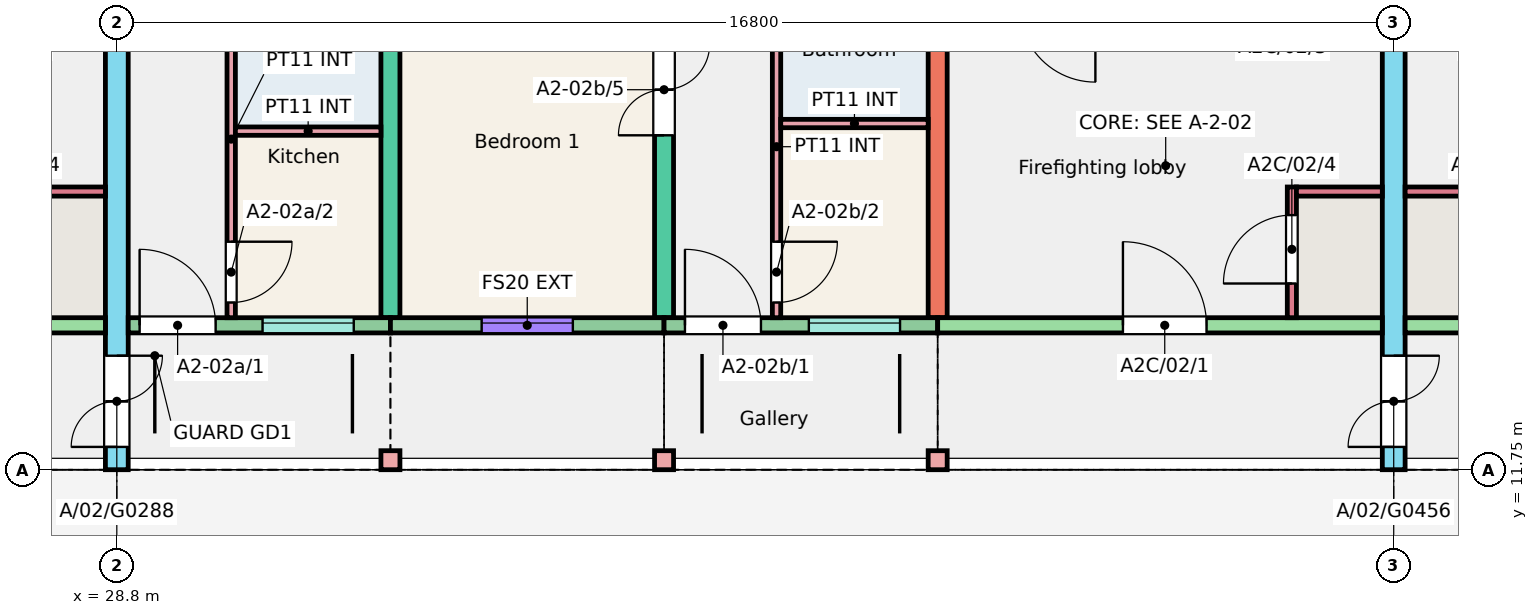
"""IFC4 building model, lengths in metres.
Left out: names, types, materials, properties, quantities, classifications, styles, units other than length and angle.
Written with IfcOpenShell. Run it as: python <this file> out.ifc"""

import sys

from ifc_helpers import new_model, si_unit, direction, frame, frame_2d, origin, origin_2d, place, context, subcontext, project, spatial, rectangle, extrude, element, fill, save


model = new_model("IFC4")
c1 = context("Model", 3, precision=1e-05, world=origin(), true_north=direction((0.0, 1.0)))
c2 = subcontext(c1, "Body", "Model", "MODEL_VIEW")
j1 = project(units=[si_unit("LENGTHUNIT", "METRE"), si_unit("PLANEANGLEUNIT", "RADIAN")], contexts=[c1])
p1 = place(None, origin())
s1 = spatial("IfcSite", under=j1, at=p1, CompositionType="ELEMENT")
p2 = place(p1, origin())
s2 = spatial("IfcBuilding", under=s1, at=p2, CompositionType="ELEMENT")
p3 = place(p2, frame((0.0, 0.0, 6.0)))
s3 = spatial("IfcBuildingStorey", under=s2, at=p3, CompositionType="ELEMENT", Elevation=6.0)
p4 = place(p3, frame((28.8, 11.75, 0.0), z_axis=(0.0, 0.0, 1.0), x_axis=(0.0, 1.0, 0.0)))
e1 = element("IfcWall", 1, at=p4, inside=s3, PredefinedType="SHEAR", context=c2, shape_type="SweptSolid", body=[
    extrude(rectangle(XDim=11.0, YDim=0.3, at=frame_2d((5.5, 0.0))), origin(), (0.0, 0.0, 1.0), 3.0),
])
p5 = place(p4, frame((0.3, 0.0, 0.0)))
e2 = element("IfcOpeningElement", 2, at=p5, cuts=e1, PredefinedType="OPENING", context=c2, shape_type="SweptSolid", body=[
    extrude(rectangle(XDim=1.2, YDim=2.1, at=frame_2d((0.6, 1.05))), frame((0.0, 0.16, 0.0), z_axis=(0.0, -1.0, 0.0), x_axis=(1.0, 0.0, 0.0)), (0.0, 0.0, 1.0), 0.32),
])
p6 = place(p3, frame((32.4, 13.75, 0.0), z_axis=(0.0, 0.0, 1.0), x_axis=(0.0, 1.0, 0.0)))
e3 = element("IfcWall", 3, at=p6, inside=s3, PredefinedType="SHEAR", context=c2, shape_type="SweptSolid", body=[
    extrude(rectangle(XDim=9.0, YDim=0.25, at=frame_2d((4.5, 0.0))), origin(), (0.0, 0.0, 1.0), 3.0),
])
p7 = place(p3, frame((36.0, 13.75, 0.0), z_axis=(0.0, 0.0, 1.0), x_axis=(0.0, 1.0, 0.0)))
e4 = element("IfcWall", 4, at=p7, inside=s3, PredefinedType="SHEAR", context=c2, shape_type="SweptSolid", body=[
    extrude(rectangle(XDim=9.0, YDim=0.25, at=frame_2d((4.5, 0.0))), origin(), (0.0, 0.0, 1.0), 3.0),
])
p8 = place(p7, frame((2.4, 0.0, 0.0)))
e5 = element("IfcOpeningElement", 5, at=p8, cuts=e4, PredefinedType="OPENING", context=c2, shape_type="SweptSolid", body=[
    extrude(rectangle(XDim=1.2, YDim=2.1, at=frame_2d((0.6, 1.05))), frame((0.0, 0.135, 0.0), z_axis=(0.0, -1.0, 0.0), x_axis=(1.0, 0.0, 0.0)), (0.0, 0.0, 1.0), 0.27),
])
p9 = place(p7, frame((6.4, 0.0, 0.0)))
e6 = element("IfcOpeningElement", 6, at=p9, cuts=e4, PredefinedType="OPENING", context=c2, shape_type="SweptSolid", body=[
    extrude(rectangle(XDim=1.2, YDim=2.1, at=frame_2d((0.6, 1.05))), frame((0.0, 0.135, 0.0), z_axis=(0.0, -1.0, 0.0), x_axis=(1.0, 0.0, 0.0)), (0.0, 0.0, 1.0), 0.27),
])
p10 = place(p3, frame((39.6, 13.75, 0.0), z_axis=(0.0, 0.0, 1.0), x_axis=(0.0, 1.0, 0.0)))
e7 = element("IfcWall", 7, at=p10, inside=s3, PredefinedType="SHEAR", context=c2, shape_type="SweptSolid", body=[
    extrude(rectangle(XDim=9.0, YDim=0.25, at=frame_2d((4.5, 0.0))), origin(), (0.0, 0.0, 1.0), 3.0),
])
p11 = place(p3, frame((45.6, 11.75, 0.0), z_axis=(0.0, 0.0, 1.0), x_axis=(0.0, 1.0, 0.0)))
e8 = element("IfcWall", 8, at=p11, inside=s3, PredefinedType="SHEAR", context=c2, shape_type="SweptSolid", body=[
    extrude(rectangle(XDim=11.0, YDim=0.3, at=frame_2d((5.5, 0.0))), origin(), (0.0, 0.0, 1.0), 3.0),
])
p12 = place(p11, frame((0.3, 0.0, 0.0)))
e9 = element("IfcOpeningElement", 9, at=p12, cuts=e8, PredefinedType="OPENING", context=c2, shape_type="SweptSolid", body=[
    extrude(rectangle(XDim=1.2, YDim=2.1, at=frame_2d((0.6, 1.05))), frame((0.0, 0.16, 0.0), z_axis=(0.0, -1.0, 0.0), x_axis=(1.0, 0.0, 0.0)), (0.0, 0.0, 1.0), 0.32),
])
p13 = place(p3, frame((22.8, 13.65, 0.0), z_axis=(0.0, 0.0, 1.0), x_axis=(1.0, 0.0, 0.0)))
e10 = element("IfcWall", 10, at=p13, inside=s3, PredefinedType="SHEAR", context=c2, shape_type="SweptSolid", body=[
    extrude(rectangle(XDim=5.85, YDim=0.2, at=frame_2d((2.925, 0.0))), origin(), (0.0, 0.0, 1.0), 3.0),
])
p14 = place(p13, frame((2.438, 0.0, 0.0)))
e11 = element("IfcOpeningElement", 11, at=p14, cuts=e10, PredefinedType="OPENING", context=c2, shape_type="SweptSolid", body=[
    extrude(rectangle(XDim=1.1, YDim=2.1, at=frame_2d((0.55, 1.05))), frame((0.0, 0.11, 0.0), z_axis=(0.0, -1.0, 0.0), x_axis=(1.0, 0.0, 0.0)), (0.0, 0.0, 1.0), 0.22),
])
p15 = place(p3, frame((27.52, 15.41, 0.0), z_axis=(0.0, 0.0, 1.0), x_axis=(1.0, 0.0, 0.0)))
e12 = element("IfcWall", 12, at=p15, inside=s3, PredefinedType="SHEAR", context=c2, shape_type="SweptSolid", body=[
    extrude(rectangle(XDim=1.13, YDim=0.12, at=frame_2d((0.565, 0.0))), origin(), (0.0, 0.0, 1.0), 3.0),
])
p16 = place(p3, frame((28.95, 13.65, 0.0), z_axis=(0.0, 0.0, 1.0), x_axis=(1.0, 0.0, 0.0)))
e13 = element("IfcWall", 13, at=p16, inside=s3, PredefinedType="SOLIDWALL", context=c2, shape_type="SweptSolid", body=[
    extrude(rectangle(XDim=3.45, YDim=0.2, at=frame_2d((1.725, 0.0))), origin(), (0.0, 0.0, 1.0), 3.0),
])
p17 = place(p16, frame((1.768, 0.0, 1.1)))
e14 = element("IfcOpeningElement", 14, at=p17, cuts=e13, PredefinedType="OPENING", context=c2, shape_type="SweptSolid", body=[
    extrude(rectangle(XDim=1.2, YDim=1.3, at=frame_2d((0.6, 0.65))), frame((0.0, 0.11, 0.0), z_axis=(0.0, -1.0, 0.0), x_axis=(1.0, 0.0, 0.0)), (0.0, 0.0, 1.0), 0.22),
])
p18 = place(p16, frame((0.15, 0.0, 0.0)))
e15 = element("IfcOpeningElement", 15, at=p18, cuts=e13, PredefinedType="OPENING", context=c2, shape_type="SweptSolid", body=[
    extrude(rectangle(XDim=1.0, YDim=2.1, at=frame_2d((0.5, 1.05))), frame((0.0, 0.11, 0.0), z_axis=(0.0, -1.0, 0.0), x_axis=(1.0, 0.0, 0.0)), (0.0, 0.0, 1.0), 0.22),
])
p19 = place(p3, frame((32.4, 13.65, 0.0), z_axis=(0.0, 0.0, 1.0), x_axis=(1.0, 0.0, 0.0)))
e16 = element("IfcWall", 16, at=p19, inside=s3, PredefinedType="SOLIDWALL", context=c2, shape_type="SweptSolid", body=[
    extrude(rectangle(XDim=3.6, YDim=0.2, at=frame_2d((1.8, 0.0))), origin(), (0.0, 0.0, 1.0), 3.0),
])
p20 = place(p19, frame((1.2, 0.0, 0.8)))
e17 = element("IfcOpeningElement", 17, at=p20, cuts=e16, PredefinedType="OPENING", context=c2, shape_type="SweptSolid", body=[
    extrude(rectangle(XDim=1.2, YDim=1.6, at=frame_2d((0.6, 0.8))), frame((0.0, 0.11, 0.0), z_axis=(0.0, -1.0, 0.0), x_axis=(1.0, 0.0, 0.0)), (0.0, 0.0, 1.0), 0.22),
])
p21 = place(p3, frame((36.0, 13.65, 0.0), z_axis=(0.0, 0.0, 1.0), x_axis=(1.0, 0.0, 0.0)))
e18 = element("IfcWall", 18, at=p21, inside=s3, PredefinedType="SOLIDWALL", context=c2, shape_type="SweptSolid", body=[
    extrude(rectangle(XDim=3.6, YDim=0.2, at=frame_2d((1.8, 0.0))), origin(), (0.0, 0.0, 1.0), 3.0),
])
p22 = place(p21, frame((1.905, 0.0, 1.1)))
e19 = element("IfcOpeningElement", 19, at=p22, cuts=e18, PredefinedType="OPENING", context=c2, shape_type="SweptSolid", body=[
    extrude(rectangle(XDim=1.2, YDim=1.3, at=frame_2d((0.6, 0.65))), frame((0.0, 0.11, 0.0), z_axis=(0.0, -1.0, 0.0), x_axis=(1.0, 0.0, 0.0)), (0.0, 0.0, 1.0), 0.22),
])
p23 = place(p21, frame((0.275, 0.0, 0.0)))
e20 = element("IfcOpeningElement", 20, at=p23, cuts=e18, PredefinedType="OPENING", context=c2, shape_type="SweptSolid", body=[
    extrude(rectangle(XDim=1.0, YDim=2.1, at=frame_2d((0.5, 1.05))), frame((0.0, 0.11, 0.0), z_axis=(0.0, -1.0, 0.0), x_axis=(1.0, 0.0, 0.0)), (0.0, 0.0, 1.0), 0.22),
])
p24 = place(p3, frame((39.6, 13.65, 0.0), z_axis=(0.0, 0.0, 1.0), x_axis=(1.0, 0.0, 0.0)))
e21 = element("IfcWall", 21, at=p24, inside=s3, PredefinedType="SHEAR", context=c2, shape_type="SweptSolid", body=[
    extrude(rectangle(XDim=5.85, YDim=0.2, at=frame_2d((2.925, 0.0))), origin(), (0.0, 0.0, 1.0), 3.0),
])
p25 = place(p24, frame((2.438, 0.0, 0.0)))
e22 = element("IfcOpeningElement", 22, at=p25, cuts=e21, PredefinedType="OPENING", context=c2, shape_type="SweptSolid", body=[
    extrude(rectangle(XDim=1.1, YDim=2.1, at=frame_2d((0.55, 1.05))), frame((0.0, 0.11, 0.0), z_axis=(0.0, -1.0, 0.0), x_axis=(1.0, 0.0, 0.0)), (0.0, 0.0, 1.0), 0.22),
])
p26 = place(p3, frame((44.26, 13.75, 0.0), z_axis=(0.0, 0.0, 1.0), x_axis=(0.0, 1.0, 0.0)))
e23 = element("IfcWall", 23, at=p26, inside=s3, PredefinedType="SHEAR", context=c2, shape_type="SweptSolid", body=[
    extrude(rectangle(XDim=1.72, YDim=0.12, at=frame_2d((0.86, 0.0))), origin(), (0.0, 0.0, 1.0), 3.0),
])
p27 = place(p26, frame((0.45, 0.0, 0.0)))
e24 = element("IfcOpeningElement", 24, at=p27, cuts=e23, PredefinedType="OPENING", context=c2, shape_type="SweptSolid", body=[
    extrude(rectangle(XDim=0.9, YDim=2.1, at=frame_2d((0.45, 1.05))), frame((0.0, 0.07, 0.0), z_axis=(0.0, -1.0, 0.0), x_axis=(1.0, 0.0, 0.0)), (0.0, 0.0, 1.0), 0.14),
])
p28 = place(p3, frame((44.32, 15.41, 0.0), z_axis=(0.0, 0.0, 1.0), x_axis=(1.0, 0.0, 0.0)))
e25 = element("IfcWall", 25, at=p28, inside=s3, PredefinedType="SHEAR", context=c2, shape_type="SweptSolid", body=[
    extrude(rectangle(XDim=1.13, YDim=0.12, at=frame_2d((0.565, 0.0))), origin(), (0.0, 0.0, 1.0), 3.0),
])
p29 = place(p3, frame((45.75, 13.65, 0.0), z_axis=(0.0, 0.0, 1.0), x_axis=(1.0, 0.0, 0.0)))
e26 = element("IfcWall", 26, at=p29, inside=s3, PredefinedType="SHEAR", context=c2, shape_type="SweptSolid", body=[
    extrude(rectangle(XDim=5.85, YDim=0.2, at=frame_2d((2.925, 0.0))), origin(), (0.0, 0.0, 1.0), 3.0),
])
p30 = place(p29, frame((2.312, 0.0, 0.0)))
e27 = element("IfcOpeningElement", 27, at=p30, cuts=e26, PredefinedType="OPENING", context=c2, shape_type="SweptSolid", body=[
    extrude(rectangle(XDim=1.1, YDim=2.1, at=frame_2d((0.55, 1.05))), frame((0.0, 0.11, 0.0), z_axis=(0.0, -1.0, 0.0), x_axis=(1.0, 0.0, 0.0)), (0.0, 0.0, 1.0), 0.22),
])
p31 = place(p3, frame((45.75, 15.41, 0.0), z_axis=(0.0, 0.0, 1.0), x_axis=(1.0, 0.0, 0.0)))
e28 = element("IfcWall", 28, at=p31, inside=s3, PredefinedType="SHEAR", context=c2, shape_type="SweptSolid", body=[
    extrude(rectangle(XDim=1.13, YDim=0.12, at=frame_2d((0.565, 0.0))), origin(), (0.0, 0.0, 1.0), 3.0),
])
for number, where, z_axis, x_axis in (
    (29, (32.4, 11.875, 0.0), (0.0, 0.0, 1.0), (1.0, 0.0, 0.0)),
    (30, (36.0, 11.875, 0.0), (0.0, 0.0, 1.0), (1.0, 0.0, 0.0)),
    (31, (39.6, 11.875, 0.0), (0.0, 0.0, 1.0), (1.0, 0.0, 0.0)),
):
    element("IfcColumn", number, at=place(p3, frame(where, z_axis=z_axis, x_axis=x_axis)), inside=s3, PredefinedType="COLUMN", context=c2, shape_type="SweptSolid", body=[
        extrude(rectangle(XDim=0.25, YDim=0.25, at=origin_2d()), origin(), (0.0, 0.0, 1.0), 3.0),
    ])
p32 = place(p3, frame((30.305, 13.75, 0.0), z_axis=(0.0, 0.0, 1.0), x_axis=(0.0, 1.0, 0.0)))
e32 = element("IfcWall", 32, at=p32, inside=s3, PredefinedType="PARTITIONING", context=c2, shape_type="SweptSolid", body=[
    extrude(rectangle(XDim=4.7, YDim=0.11, at=frame_2d((2.35, 0.0))), origin(), (0.0, 0.0, 1.0), 2.8),
])
p33 = place(p32, frame((0.2, 0.0, 0.0)))
e33 = element("IfcOpeningElement", 33, at=p33, cuts=e32, PredefinedType="OPENING", context=c2, shape_type="SweptSolid", body=[
    extrude(rectangle(XDim=0.8, YDim=2.1, at=frame_2d((0.4, 1.05))), frame((0.0, 0.065, 0.0), z_axis=(0.0, -1.0, 0.0), x_axis=(1.0, 0.0, 0.0)), (0.0, 0.0, 1.0), 0.13),
])
p34 = place(p32, frame((3.75, 0.0, 0.0)))
e34 = element("IfcOpeningElement", 34, at=p34, cuts=e32, PredefinedType="OPENING", context=c2, shape_type="SweptSolid", body=[
    extrude(rectangle(XDim=0.8, YDim=2.1, at=frame_2d((0.4, 1.05))), frame((0.0, 0.065, 0.0), z_axis=(0.0, -1.0, 0.0), x_axis=(1.0, 0.0, 0.0)), (0.0, 0.0, 1.0), 0.13),
])
p35 = place(p3, frame((30.36, 16.205, 0.0), z_axis=(0.0, 0.0, 1.0), x_axis=(1.0, 0.0, 0.0)))
e35 = element("IfcWall", 35, at=p35, inside=s3, PredefinedType="PARTITIONING", context=c2, shape_type="SweptSolid", body=[
    extrude(rectangle(XDim=1.915, YDim=0.11, at=frame_2d((0.958, 0.0))), origin(), (0.0, 0.0, 1.0), 2.8),
])
p36 = place(p3, frame((37.48, 13.75, 0.0), z_axis=(0.0, 0.0, 1.0), x_axis=(0.0, 1.0, 0.0)))
e36 = element("IfcWall", 36, at=p36, inside=s3, PredefinedType="PARTITIONING", context=c2, shape_type="SweptSolid", body=[
    extrude(rectangle(XDim=4.5, YDim=0.11, at=frame_2d((2.25, 0.0))), origin(), (0.0, 0.0, 1.0), 2.8),
])
p37 = place(p36, frame((0.2, 0.0, 0.0)))
e37 = element("IfcOpeningElement", 37, at=p37, cuts=e36, PredefinedType="OPENING", context=c2, shape_type="SweptSolid", body=[
    extrude(rectangle(XDim=0.8, YDim=2.1, at=frame_2d((0.4, 1.05))), frame((0.0, 0.065, 0.0), z_axis=(0.0, -1.0, 0.0), x_axis=(1.0, 0.0, 0.0)), (0.0, 0.0, 1.0), 0.13),
])
p38 = place(p36, frame((3.55, 0.0, 0.0)))
e38 = element("IfcOpeningElement", 38, at=p38, cuts=e36, PredefinedType="OPENING", context=c2, shape_type="SweptSolid", body=[
    extrude(rectangle(XDim=0.8, YDim=2.1, at=frame_2d((0.4, 1.05))), frame((0.0, 0.065, 0.0), z_axis=(0.0, -1.0, 0.0), x_axis=(1.0, 0.0, 0.0)), (0.0, 0.0, 1.0), 0.13),
])
p39 = place(p3, frame((37.535, 16.305, 0.0), z_axis=(0.0, 0.0, 1.0), x_axis=(1.0, 0.0, 0.0)))
e39 = element("IfcWall", 39, at=p39, inside=s3, PredefinedType="PARTITIONING", context=c2, shape_type="SweptSolid", body=[
    extrude(rectangle(XDim=1.94, YDim=0.11, at=frame_2d((0.97, 0.0))), origin(), (0.0, 0.0, 1.0), 2.8),
])
p40 = place(p17, origin())
e40 = element("IfcWindow", 40, at=p40, inside=s3, PartitioningType="SINGLE_PANEL", PredefinedType="WINDOW", context=c2, shape_type="SweptSolid", body=[
    extrude(rectangle(XDim=1.2, YDim=1.3, at=frame_2d((0.6, 0.65))), frame((0.0, 0.06, 0.0), z_axis=(0.0, -1.0, 0.0), x_axis=(1.0, 0.0, 0.0)), (0.0, 0.0, 1.0), 0.06),
])
fill(e14, e40)
p41 = place(p20, origin())
e41 = element("IfcWindow", 41, at=p41, inside=s3, PartitioningType="SINGLE_PANEL", PredefinedType="WINDOW", context=c2, shape_type="SweptSolid", body=[
    extrude(rectangle(XDim=1.2, YDim=1.6, at=frame_2d((0.6, 0.8))), frame((0.0, 0.06, 0.0), z_axis=(0.0, -1.0, 0.0), x_axis=(1.0, 0.0, 0.0)), (0.0, 0.0, 1.0), 0.06),
])
fill(e17, e41)
p42 = place(p22, origin())
e42 = element("IfcWindow", 42, at=p42, inside=s3, PartitioningType="SINGLE_PANEL", PredefinedType="WINDOW", context=c2, shape_type="SweptSolid", body=[
    extrude(rectangle(XDim=1.2, YDim=1.3, at=frame_2d((0.6, 0.65))), frame((0.0, 0.06, 0.0), z_axis=(0.0, -1.0, 0.0), x_axis=(1.0, 0.0, 0.0)), (0.0, 0.0, 1.0), 0.06),
])
fill(e19, e42)
p43 = place(p18, origin())
e43 = element("IfcDoor", 43, at=p43, inside=s3, OperationType="SINGLE_SWING_LEFT", PredefinedType="DOOR", context=c2, shape_type="SweptSolid", body=[
    extrude(rectangle(XDim=1.0, YDim=2.1, at=frame_2d((0.5, 1.05))), frame((0.0, 0.025, 0.0), z_axis=(0.0, -1.0, 0.0), x_axis=(1.0, 0.0, 0.0)), (0.0, 0.0, 1.0), 0.05),
])
fill(e15, e43)
p44 = place(p33, origin())
e44 = element("IfcDoor", 44, at=p44, inside=s3, OperationType="SINGLE_SWING_RIGHT", PredefinedType="DOOR", context=c2, shape_type="SweptSolid", body=[
    extrude(rectangle(XDim=0.8, YDim=2.1, at=frame_2d((0.4, 1.05))), frame((0.0, 0.025, 0.0), z_axis=(0.0, -1.0, 0.0), x_axis=(1.0, 0.0, 0.0)), (0.0, 0.0, 1.0), 0.05),
])
fill(e33, e44)
p45 = place(p23, origin())
e45 = element("IfcDoor", 45, at=p45, inside=s3, OperationType="SINGLE_SWING_LEFT", PredefinedType="DOOR", context=c2, shape_type="SweptSolid", body=[
    extrude(rectangle(XDim=1.0, YDim=2.1, at=frame_2d((0.5, 1.05))), frame((0.0, 0.025, 0.0), z_axis=(0.0, -1.0, 0.0), x_axis=(1.0, 0.0, 0.0)), (0.0, 0.0, 1.0), 0.05),
])
fill(e20, e45)
p46 = place(p37, origin())
e46 = element("IfcDoor", 46, at=p46, inside=s3, OperationType="SINGLE_SWING_RIGHT", PredefinedType="DOOR", context=c2, shape_type="SweptSolid", body=[
    extrude(rectangle(XDim=0.8, YDim=2.1, at=frame_2d((0.4, 1.05))), frame((0.0, 0.025, 0.0), z_axis=(0.0, -1.0, 0.0), x_axis=(1.0, 0.0, 0.0)), (0.0, 0.0, 1.0), 0.05),
])
fill(e37, e46)
p47 = place(p8, origin())
e47 = element("IfcDoor", 47, at=p47, inside=s3, OperationType="DOUBLE_DOOR_SINGLE_SWING", PredefinedType="DOOR", context=c2, shape_type="SweptSolid", body=[
    extrude(rectangle(XDim=1.2, YDim=2.1, at=frame_2d((0.6, 1.05))), frame((0.0, 0.025, 0.0), z_axis=(0.0, -1.0, 0.0), x_axis=(1.0, 0.0, 0.0)), (0.0, 0.0, 1.0), 0.05),
])
fill(e5, e47)
p48 = place(p25, origin())
e48 = element("IfcDoor", 48, at=p48, inside=s3, OperationType="SINGLE_SWING_LEFT", PredefinedType="DOOR", context=c2, shape_type="SweptSolid", body=[
    extrude(rectangle(XDim=1.1, YDim=2.1, at=frame_2d((0.55, 1.05))), frame((0.0, 0.025, 0.0), z_axis=(0.0, -1.0, 0.0), x_axis=(1.0, 0.0, 0.0)), (0.0, 0.0, 1.0), 0.05),
])
fill(e22, e48)
p49 = place(p27, origin())
e49 = element("IfcDoor", 49, at=p49, inside=s3, OperationType="SINGLE_SWING_LEFT", PredefinedType="DOOR", context=c2, shape_type="SweptSolid", body=[
    extrude(rectangle(XDim=0.9, YDim=2.1, at=frame_2d((0.45, 1.05))), frame((0.0, 0.025, 0.0), z_axis=(0.0, -1.0, 0.0), x_axis=(1.0, 0.0, 0.0)), (0.0, 0.0, 1.0), 0.05),
])
fill(e24, e49)
p50 = place(p5, origin())
e50 = element("IfcDoor", 50, at=p50, inside=s3, OperationType="DOUBLE_DOOR_SINGLE_SWING", PredefinedType="DOOR", context=c2, shape_type="SweptSolid", body=[
    extrude(rectangle(XDim=1.2, YDim=2.1, at=frame_2d((0.6, 1.05))), frame((0.0, 0.025, 0.0), z_axis=(0.0, -1.0, 0.0), x_axis=(1.0, 0.0, 0.0)), (0.0, 0.0, 1.0), 0.05),
])
fill(e2, e50)
p51 = place(p12, origin())
e51 = element("IfcDoor", 51, at=p51, inside=s3, OperationType="DOUBLE_DOOR_SINGLE_SWING", PredefinedType="DOOR", context=c2, shape_type="SweptSolid", body=[
    extrude(rectangle(XDim=1.2, YDim=2.1, at=frame_2d((0.6, 1.05))), frame((0.0, 0.025, 0.0), z_axis=(0.0, -1.0, 0.0), x_axis=(1.0, 0.0, 0.0)), (0.0, 0.0, 1.0), 0.05),
])
fill(e9, e51)
save(model, sys.argv[1])
